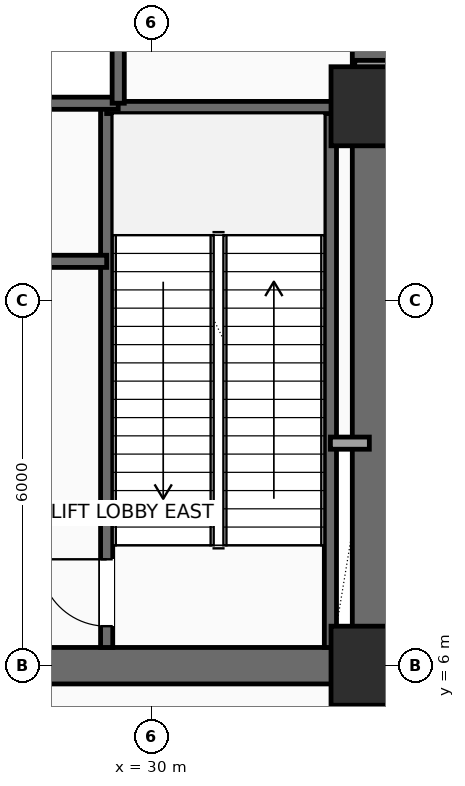
"""IFC4 building model, lengths in metres.
Left out: names, types, materials, properties, quantities, classifications, styles, units other than length and angle.
Written with IfcOpenShell. Run it as: python <this file> out.ifc"""

import sys

from ifc_helpers import new_model, si_unit, direction, frame, frame_2d, origin, origin_2d, place, context, subcontext, project, spatial, rectangle, extrude, element, fill, save


model = new_model("IFC4")
c1 = context("Model", 3, precision=1e-05, world=origin(), true_north=direction((0.0, 1.0)))
c2 = subcontext(c1, "Body", "Model", "MODEL_VIEW")
j1 = project(units=[si_unit("LENGTHUNIT", "METRE"), si_unit("PLANEANGLEUNIT", "RADIAN")], contexts=[c1])
p1 = place(None, origin())
s1 = spatial("IfcSite", under=j1, at=p1, CompositionType="ELEMENT")
p2 = place(p1, origin())
s2 = spatial("IfcBuilding", under=s1, at=p2, CompositionType="ELEMENT")
p3 = place(p2, frame((0.0, 0.0, 11.1)))
s3 = spatial("IfcBuildingStorey", under=s2, at=p3, CompositionType="ELEMENT", Elevation=11.1)
for number, where, z_axis, x_axis in (
    (1, (33.6, 6.0, 0.0), (0.0, 0.0, 1.0), (1.0, 0.0, 0.0)),
    (2, (33.6, 15.2, 0.0), (0.0, 0.0, 1.0), (1.0, 0.0, 0.0)),
):
    element("IfcColumn", number, at=place(p3, frame(where, z_axis=z_axis, x_axis=x_axis)), inside=s3, PredefinedType="COLUMN", context=c2, shape_type="SweptSolid", body=[
        extrude(rectangle(XDim=1.3, YDim=1.3, at=origin_2d()), origin(), (0.0, 0.0, 1.0), 5.4),
    ])
p4 = place(p3, frame((24.0, 6.0, 0.0), z_axis=(0.0, 0.0, 1.0), x_axis=(1.0, 0.0, 0.0)))
e3 = element("IfcWall", 3, at=p4, inside=s3, PredefinedType="SHEAR", context=c2, shape_type="SweptSolid", body=[
    extrude(rectangle(XDim=9.6, YDim=0.6, at=frame_2d((4.8, 0.0))), origin(), (0.0, 0.0, 1.0), 5.1),
])
p5 = place(p3, frame((33.6, 6.0, 0.0), z_axis=(0.0, 0.0, 1.0), x_axis=(0.0, 1.0, 0.0)))
e4 = element("IfcWall", 4, at=p5, inside=s3, PredefinedType="SHEAR", context=c2, shape_type="SweptSolid", body=[
    extrude(rectangle(XDim=12.0, YDim=0.6, at=frame_2d((6.0, 0.0))), origin(), (0.0, 0.0, 1.0), 5.1),
])
p6 = place(p5, frame((10.2, 0.0, 0.0)))
e5 = element("IfcOpeningElement", 5, at=p6, cuts=e4, PredefinedType="OPENING", context=c2, shape_type="SweptSolid", body=[
    extrude(rectangle(XDim=0.9, YDim=2.15, at=frame_2d((0.45, 1.075))), frame((0.0, 0.31, 0.0), z_axis=(0.0, -1.0, 0.0), x_axis=(1.0, 0.0, 0.0)), (0.0, 0.0, 1.0), 0.62),
])
p7 = place(p3, frame((29.26, 6.3, 0.0), z_axis=(0.0, 0.0, 1.0), x_axis=(0.0, 1.0, 0.0)))
e6 = element("IfcWall", 6, at=p7, inside=s3, PredefinedType="SHEAR", context=c2, shape_type="SweptSolid", body=[
    extrude(rectangle(XDim=8.88, YDim=0.2, at=frame_2d((4.44, 0.0))), origin(), (0.0, 0.0, 1.0), 5.1),
])
p8 = place(p7, frame((0.35, 0.0, 0.0)))
e7 = element("IfcOpeningElement", 7, at=p8, cuts=e6, PredefinedType="OPENING", context=c2, shape_type="SweptSolid", body=[
    extrude(rectangle(XDim=1.1, YDim=2.2, at=frame_2d((0.55, 1.1))), frame((0.0, 0.11, 0.0), z_axis=(0.0, -1.0, 0.0), x_axis=(1.0, 0.0, 0.0)), (0.0, 0.0, 1.0), 0.22),
])
p9 = place(p3, frame((32.94, 6.3, 0.0), z_axis=(0.0, 0.0, 1.0), x_axis=(0.0, 1.0, 0.0)))
e8 = element("IfcWall", 8, at=p9, inside=s3, PredefinedType="SHEAR", context=c2, shape_type="SweptSolid", body=[
    extrude(rectangle(XDim=8.88, YDim=0.2, at=frame_2d((4.44, 0.0))), origin(), (0.0, 0.0, 1.0), 5.1),
])
p10 = place(p3, frame((29.26, 15.18, 0.0), z_axis=(0.0, 0.0, 1.0), x_axis=(1.0, 0.0, 0.0)))
e9 = element("IfcWall", 9, at=p10, inside=s3, PredefinedType="SHEAR", context=c2, shape_type="SweptSolid", body=[
    extrude(rectangle(XDim=4.04, YDim=0.2, at=frame_2d((2.02, 0.0))), origin(), (0.0, 0.0, 1.0), 5.1),
])
p11 = place(p3, frame((26.42, 12.65, 0.0), z_axis=(0.0, 0.0, 1.0), x_axis=(1.0, 0.0, 0.0)))
e10 = element("IfcWall", 10, at=p11, inside=s3, PredefinedType="SHEAR", context=c2, shape_type="SweptSolid", body=[
    extrude(rectangle(XDim=2.84, YDim=0.2, at=frame_2d((1.42, 0.0))), origin(), (0.0, 0.0, 1.0), 5.1),
])
p12 = place(p11, frame((0.9, 0.0, 0.0)))
e11 = element("IfcOpeningElement", 11, at=p12, cuts=e10, PredefinedType="OPENING", context=c2, shape_type="SweptSolid", body=[
    extrude(rectangle(XDim=0.9, YDim=2.15, at=frame_2d((0.45, 1.075))), frame((0.0, 0.11, 0.0), z_axis=(0.0, -1.0, 0.0), x_axis=(1.0, 0.0, 0.0)), (0.0, 0.0, 1.0), 0.22),
])
p13 = place(p3, frame((32.94, 9.66, 0.0), z_axis=(0.0, 0.0, 1.0), x_axis=(1.0, 0.0, 0.0)))
e12 = element("IfcWall", 12, at=p13, inside=s3, PredefinedType="SOLIDWALL", context=c2, shape_type="SweptSolid", body=[
    extrude(rectangle(XDim=0.64, YDim=0.2, at=frame_2d((0.32, 0.0))), origin(), (0.0, 0.0, 1.0), 5.1),
])
p14 = place(p3, frame((24.25, 15.25, 0.0), z_axis=(0.0, 0.0, 1.0), x_axis=(1.0, 0.0, 0.0)))
e13 = element("IfcWall", 13, at=p14, inside=s3, PredefinedType="SHEAR", context=c2, shape_type="SweptSolid", body=[
    extrude(rectangle(XDim=5.2, YDim=0.2, at=frame_2d((2.6, 0.0))), origin(), (0.0, 0.0, 1.0), 5.1),
])
p15 = place(p3, frame((29.45, 15.25, 0.0), z_axis=(0.0, 0.0, 1.0), x_axis=(0.0, 1.0, 0.0)))
e14 = element("IfcWall", 14, at=p15, inside=s3, PredefinedType="SHEAR", context=c2, shape_type="SweptSolid", body=[
    extrude(rectangle(XDim=2.45, YDim=0.2, at=frame_2d((1.225, 0.0))), origin(), (0.0, 0.0, 1.0), 5.1),
])
p16 = place(p3, frame((36.15, 15.88, 0.0), z_axis=(0.0, 0.0, 1.0), x_axis=(-1.0, 0.0, 0.0)))
e15 = element("IfcWall", 15, at=p16, inside=s3, PredefinedType="PARTITIONING", context=c2, shape_type="SweptSolid", body=[
    extrude(rectangle(XDim=2.81, YDim=0.15, at=frame_2d((1.405, 0.0))), origin(), (0.0, 0.0, 1.0), 5.1),
])
p17 = place(p8, origin())
e16 = element("IfcDoor", 16, at=p17, inside=s3, OperationType="SINGLE_SWING_RIGHT", PredefinedType="DOOR", context=c2, shape_type="SweptSolid", body=[
    extrude(rectangle(XDim=1.1, YDim=2.2, at=frame_2d((0.55, 1.1))), frame((0.0, 0.025, 0.0), z_axis=(0.0, -1.0, 0.0), x_axis=(1.0, 0.0, 0.0)), (0.0, 0.0, 1.0), 0.05),
])
fill(e7, e16)
save(model, sys.argv[1])
